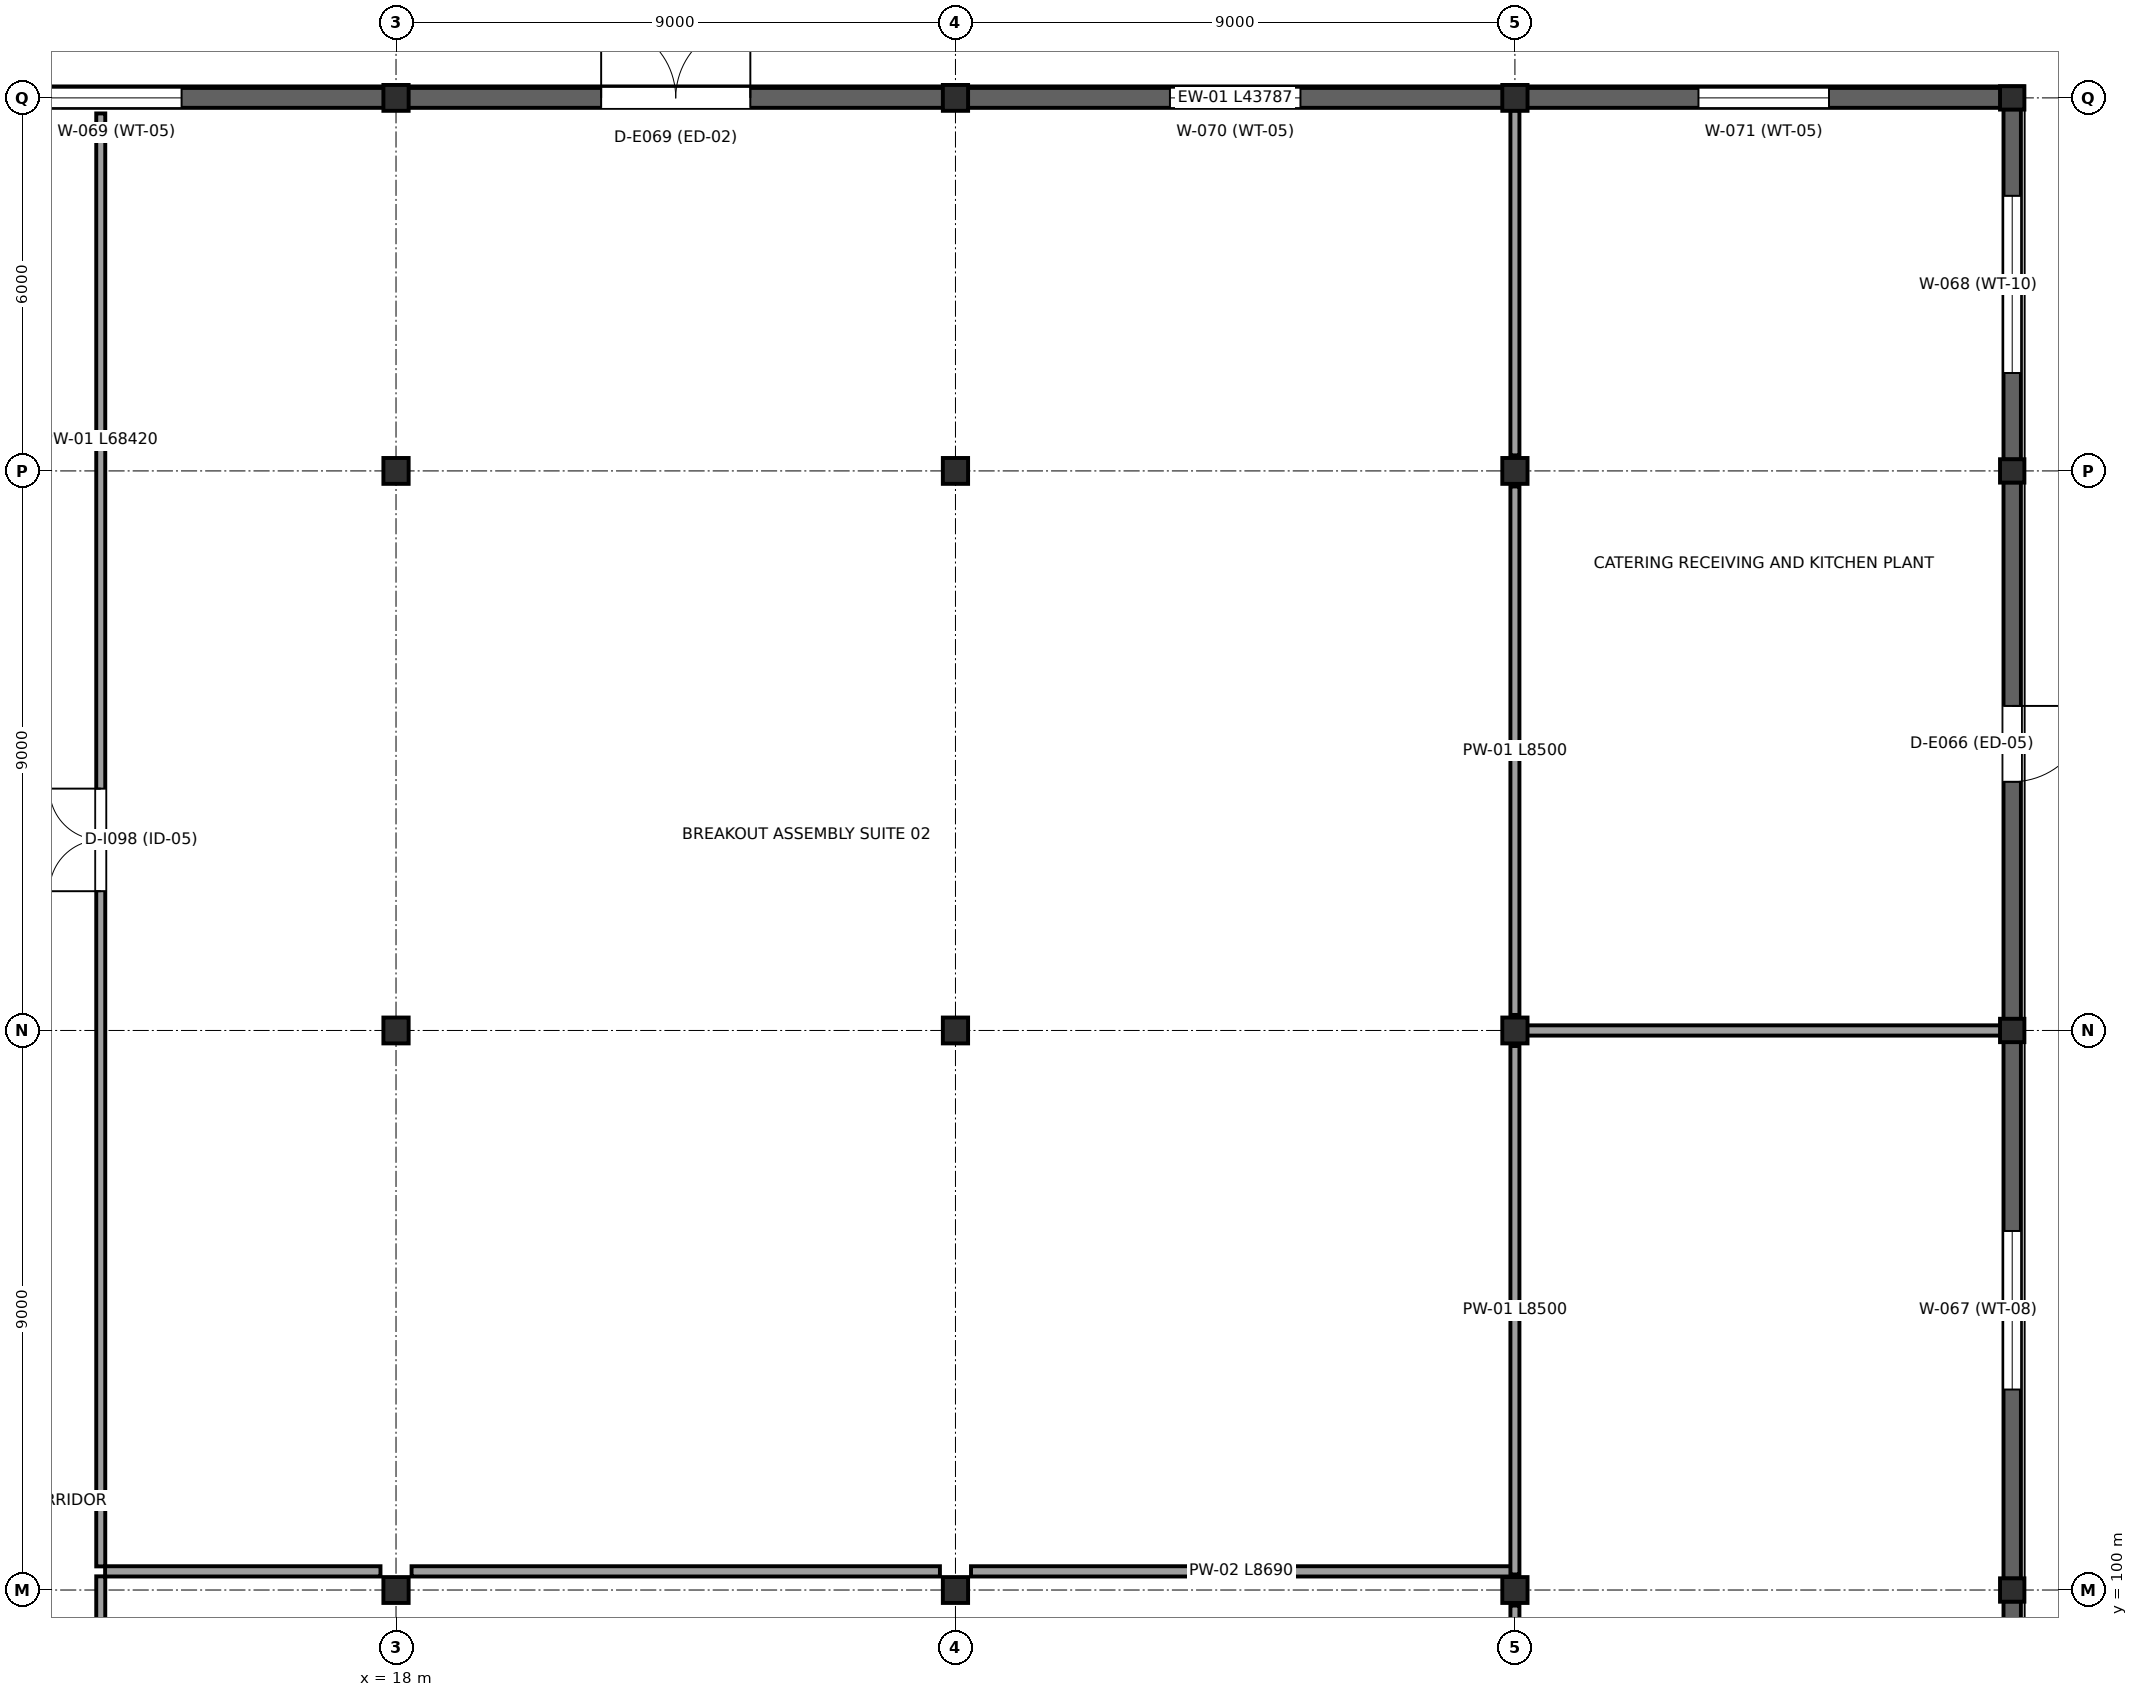
"""IFC4 building model, lengths in metres.
Left out: names, types, materials, properties, quantities, classifications, styles, units other than length and angle.
Written with IfcOpenShell. Run it as: python <this file> out.ifc"""

import sys

from ifc_helpers import new_model, si_unit, direction, frame, frame_2d, origin, origin_2d, place, context, subcontext, project, spatial, rectangle, i_section, extrude, element, fill, save


model = new_model("IFC4")
c1 = context("Model", 3, precision=1e-05, world=origin(), true_north=direction((0.0, 1.0)))
c2 = subcontext(c1, "Body", "Model", "MODEL_VIEW")
j1 = project(units=[si_unit("LENGTHUNIT", "METRE"), si_unit("PLANEANGLEUNIT", "RADIAN")], contexts=[c1])
p1 = place(None, origin())
s1 = spatial("IfcSite", under=j1, at=p1, CompositionType="ELEMENT")
p2 = place(p1, origin())
s2 = spatial("IfcBuilding", under=s1, at=p2, CompositionType="ELEMENT")
p3 = place(p2, origin())
s3 = spatial("IfcBuildingStorey", under=s2, at=p3, CompositionType="ELEMENT", Elevation=0.0)
for number, where, z_axis, x_axis in (
    (1, (18.0, 100.0, 0.0), (0.0, 0.0, 1.0), (1.0, 0.0, 0.0)),
    (2, (18.0, 109.0, 0.0), (0.0, 0.0, 1.0), (1.0, 0.0, 0.0)),
    (3, (18.0, 118.0, 0.0), (0.0, 0.0, 1.0), (1.0, 0.0, 0.0)),
    (4, (18.0, 124.0, 0.0), (0.0, 0.0, 1.0), (1.0, 0.0, 0.0)),
    (5, (27.0, 100.0, 0.0), (0.0, 0.0, 1.0), (1.0, 0.0, 0.0)),
    (6, (27.0, 109.0, 0.0), (0.0, 0.0, 1.0), (1.0, 0.0, 0.0)),
    (7, (27.0, 118.0, 0.0), (0.0, 0.0, 1.0), (1.0, 0.0, 0.0)),
    (8, (27.0, 124.0, 0.0), (0.0, 0.0, 1.0), (1.0, 0.0, 0.0)),
    (9, (36.0, 100.0, 0.0), (0.0, 0.0, 1.0), (1.0, 0.0, 0.0)),
    (10, (36.0, 109.0, 0.0), (0.0, 0.0, 1.0), (1.0, 0.0, 0.0)),
    (11, (36.0, 118.0, 0.0), (0.0, 0.0, 1.0), (1.0, 0.0, 0.0)),
    (12, (36.0, 124.0, 0.0), (0.0, 0.0, 1.0), (1.0, 0.0, 0.0)),
):
    element("IfcColumn", number, at=place(p3, frame(where, z_axis=z_axis, x_axis=x_axis)), inside=s3, PredefinedType="COLUMN", context=c2, shape_type="SweptSolid", body=[
        extrude(i_section(OverallWidth=0.406, OverallDepth=0.416, WebThickness=0.03, FlangeThickness=0.048, at=origin_2d()), origin(), (0.0, 0.0, 1.0), 6.0),
    ])
for number, where, z_axis, x_axis in (
    (13, (44.0, 100.0, 0.0), (0.0, 0.0, 1.0), (1.0, 0.0, 0.0)),
    (14, (44.0, 109.0, 0.0), (0.0, 0.0, 1.0), (1.0, 0.0, 0.0)),
    (15, (44.0, 118.0, 0.0), (0.0, 0.0, 1.0), (1.0, 0.0, 0.0)),
    (16, (44.0, 124.0, 0.0), (0.0, 0.0, 1.0), (1.0, 0.0, 0.0)),
):
    element("IfcColumn", number, at=place(p3, frame(where, z_axis=z_axis, x_axis=x_axis)), inside=s3, PredefinedType="COLUMN", context=c2, shape_type="SweptSolid", body=[
        extrude(i_section(OverallWidth=0.392, OverallDepth=0.376, WebThickness=0.017, FlangeThickness=0.028, at=origin_2d()), origin(), (0.0, 0.0, 1.0), 6.0),
    ])
p4 = place(p3, frame((44.0, 99.818, 0.0), z_axis=(0.0, 0.0, 1.0), x_axis=(0.0, -1.0, 0.0)))
e17 = element("IfcWall", 17, at=p4, inside=s3, PredefinedType="STANDARD", context=c2, shape_type="SweptSolid", body=[
    extrude(rectangle(XDim=8.636, YDim=0.28, at=frame_2d((4.318, 0.0))), origin(), (0.0, 0.0, 1.0), 5.78),
])
p5 = place(p4, frame((4.818, 0.0, 0.0)))
e18 = element("IfcOpeningElement", 18, at=p5, cuts=e17, PredefinedType="OPENING", context=c2, shape_type="SweptSolid", body=[
    extrude(rectangle(XDim=2.0, YDim=2.4, at=frame_2d((1.0, 1.2))), frame((0.0, 0.15, 0.0), z_axis=(0.0, -1.0, 0.0), x_axis=(1.0, 0.0, 0.0)), (0.0, 0.0, 1.0), 0.3),
])
p6 = place(p3, frame((44.0, 108.818, 0.0), z_axis=(0.0, 0.0, 1.0), x_axis=(0.0, -1.0, 0.0)))
e19 = element("IfcWall", 19, at=p6, inside=s3, PredefinedType="STANDARD", context=c2, shape_type="SweptSolid", body=[
    extrude(rectangle(XDim=8.636, YDim=0.28, at=frame_2d((4.318, 0.0))), origin(), (0.0, 0.0, 1.0), 5.78),
])
p7 = place(p6, frame((3.043, 0.0, 1.0)))
e20 = element("IfcOpeningElement", 20, at=p7, cuts=e19, PredefinedType="OPENING", context=c2, shape_type="SweptSolid", body=[
    extrude(rectangle(XDim=2.55, YDim=2.4, at=frame_2d((1.275, 1.2))), frame((0.0, 0.15, 0.0), z_axis=(0.0, -1.0, 0.0), x_axis=(1.0, 0.0, 0.0)), (0.0, 0.0, 1.0), 0.3),
])
p8 = place(p3, frame((44.0, 117.818, 0.0), z_axis=(0.0, 0.0, 1.0), x_axis=(0.0, -1.0, 0.0)))
e21 = element("IfcWall", 21, at=p8, inside=s3, PredefinedType="STANDARD", context=c2, shape_type="SweptSolid", body=[
    extrude(rectangle(XDim=8.636, YDim=0.28, at=frame_2d((4.318, 0.0))), origin(), (0.0, 0.0, 1.0), 5.78),
])
p9 = place(p8, frame((3.598, 0.0, 0.0)))
e22 = element("IfcOpeningElement", 22, at=p9, cuts=e21, PredefinedType="OPENING", context=c2, shape_type="SweptSolid", body=[
    extrude(rectangle(XDim=1.22, YDim=2.32, at=frame_2d((0.61, 1.16))), frame((0.0, 0.15, 0.0), z_axis=(0.0, -1.0, 0.0), x_axis=(1.0, 0.0, 0.0)), (0.0, 0.0, 1.0), 0.3),
])
p10 = place(p3, frame((44.0, 123.818, 0.0), z_axis=(0.0, 0.0, 1.0), x_axis=(0.0, -1.0, 0.0)))
e23 = element("IfcWall", 23, at=p10, inside=s3, PredefinedType="STANDARD", context=c2, shape_type="SweptSolid", body=[
    extrude(rectangle(XDim=5.636, YDim=0.28, at=frame_2d((2.818, 0.0))), origin(), (0.0, 0.0, 1.0), 5.78),
])
p11 = place(p10, frame((1.393, 0.0, 1.0)))
e24 = element("IfcOpeningElement", 24, at=p11, cuts=e23, PredefinedType="OPENING", context=c2, shape_type="SweptSolid", body=[
    extrude(rectangle(XDim=2.85, YDim=2.4, at=frame_2d((1.425, 1.2))), frame((0.0, 0.15, 0.0), z_axis=(0.0, -1.0, 0.0), x_axis=(1.0, 0.0, 0.0)), (0.0, 0.0, 1.0), 0.3),
])
p12 = place(p3, frame((9.022, 124.0, 0.0), z_axis=(0.0, 0.0, 1.0), x_axis=(1.0, 0.0, 0.0)))
e25 = element("IfcWall", 25, at=p12, inside=s3, PredefinedType="STANDARD", context=c2, shape_type="SweptSolid", body=[
    extrude(rectangle(XDim=8.956, YDim=0.32, at=frame_2d((4.478, 0.0))), origin(), (0.0, 0.0, 1.0), 5.78),
])
p13 = place(p12, frame((3.428, 0.0, 1.0)))
e26 = element("IfcOpeningElement", 26, at=p13, cuts=e25, PredefinedType="OPENING", context=c2, shape_type="SweptSolid", body=[
    extrude(rectangle(XDim=2.1, YDim=2.25, at=frame_2d((1.05, 1.125))), frame((0.0, 0.17, 0.0), z_axis=(0.0, -1.0, 0.0), x_axis=(1.0, 0.0, 0.0)), (0.0, 0.0, 1.0), 0.34),
])
p14 = place(p3, frame((18.022, 124.0, 0.0), z_axis=(0.0, 0.0, 1.0), x_axis=(1.0, 0.0, 0.0)))
e27 = element("IfcWall", 27, at=p14, inside=s3, PredefinedType="STANDARD", context=c2, shape_type="SweptSolid", body=[
    extrude(rectangle(XDim=8.956, YDim=0.32, at=frame_2d((4.478, 0.0))), origin(), (0.0, 0.0, 1.0), 5.78),
])
p15 = place(p14, frame((3.278, 0.0, 0.0)))
e28 = element("IfcOpeningElement", 28, at=p15, cuts=e27, PredefinedType="OPENING", context=c2, shape_type="SweptSolid", body=[
    extrude(rectangle(XDim=2.4, YDim=2.6, at=frame_2d((1.2, 1.3))), frame((0.0, 0.17, 0.0), z_axis=(0.0, -1.0, 0.0), x_axis=(1.0, 0.0, 0.0)), (0.0, 0.0, 1.0), 0.34),
])
p16 = place(p3, frame((27.022, 124.0, 0.0), z_axis=(0.0, 0.0, 1.0), x_axis=(1.0, 0.0, 0.0)))
e29 = element("IfcWall", 29, at=p16, inside=s3, PredefinedType="STANDARD", context=c2, shape_type="SweptSolid", body=[
    extrude(rectangle(XDim=8.956, YDim=0.32, at=frame_2d((4.478, 0.0))), origin(), (0.0, 0.0, 1.0), 5.78),
])
p17 = place(p16, frame((3.428, 0.0, 1.0)))
e30 = element("IfcOpeningElement", 30, at=p17, cuts=e29, PredefinedType="OPENING", context=c2, shape_type="SweptSolid", body=[
    extrude(rectangle(XDim=2.1, YDim=2.25, at=frame_2d((1.05, 1.125))), frame((0.0, 0.17, 0.0), z_axis=(0.0, -1.0, 0.0), x_axis=(1.0, 0.0, 0.0)), (0.0, 0.0, 1.0), 0.34),
])
p18 = place(p3, frame((36.022, 124.0, 0.0), z_axis=(0.0, 0.0, 1.0), x_axis=(1.0, 0.0, 0.0)))
e31 = element("IfcWall", 31, at=p18, inside=s3, PredefinedType="STANDARD", context=c2, shape_type="SweptSolid", body=[
    extrude(rectangle(XDim=7.963, YDim=0.32, at=frame_2d((3.981, 0.0))), origin(), (0.0, 0.0, 1.0), 5.78),
])
p19 = place(p18, frame((2.931, 0.0, 1.0)))
e32 = element("IfcOpeningElement", 32, at=p19, cuts=e31, PredefinedType="OPENING", context=c2, shape_type="SweptSolid", body=[
    extrude(rectangle(XDim=2.1, YDim=2.25, at=frame_2d((1.05, 1.125))), frame((0.0, 0.17, 0.0), z_axis=(0.0, -1.0, 0.0), x_axis=(1.0, 0.0, 0.0)), (0.0, 0.0, 1.0), 0.34),
])
p20 = place(p3, frame((13.25, 82.08, 0.0), z_axis=(0.0, 0.0, 1.0), x_axis=(0.0, 1.0, 0.0)))
e33 = element("IfcWall", 33, at=p20, inside=s3, PredefinedType="PARTITIONING", context=c2, shape_type="SweptSolid", body=[
    extrude(rectangle(XDim=18.14, YDim=0.145, at=frame_2d((9.07, 0.0))), origin(), (0.0, 0.0, 1.0), 4.65),
])
p21 = place(p20, frame((8.245, 0.0, 0.0)))
e34 = element("IfcOpeningElement", 34, at=p21, cuts=e33, PredefinedType="OPENING", context=c2, shape_type="SweptSolid", body=[
    extrude(rectangle(XDim=1.65, YDim=2.25, at=frame_2d((0.825, 1.125))), frame((0.0, 0.083, 0.0), z_axis=(0.0, -1.0, 0.0), x_axis=(1.0, 0.0, 0.0)), (0.0, 0.0, 1.0), 0.165),
])
p22 = place(p3, frame((13.25, 100.38, 0.0), z_axis=(0.0, 0.0, 1.0), x_axis=(0.0, 1.0, 0.0)))
e35 = element("IfcWall", 35, at=p22, inside=s3, PredefinedType="PARTITIONING", context=c2, shape_type="SweptSolid", body=[
    extrude(rectangle(XDim=23.37, YDim=0.145, at=frame_2d((11.685, 0.0))), origin(), (0.0, 0.0, 1.0), 4.65),
])
p23 = place(p22, frame((10.86, 0.0, 0.0)))
e36 = element("IfcOpeningElement", 36, at=p23, cuts=e35, PredefinedType="OPENING", context=c2, shape_type="SweptSolid", body=[
    extrude(rectangle(XDim=1.65, YDim=2.25, at=frame_2d((0.825, 1.125))), frame((0.0, 0.083, 0.0), z_axis=(0.0, -1.0, 0.0), x_axis=(1.0, 0.0, 0.0)), (0.0, 0.0, 1.0), 0.165),
])
p24 = place(p3, frame((13.32, 100.3, 0.0), z_axis=(0.0, 0.0, 1.0), x_axis=(1.0, 0.0, 0.0)))
e37 = element("IfcWall", 37, at=p24, inside=s3, PredefinedType="PARTITIONING", context=c2, shape_type="SweptSolid", body=[
    extrude(rectangle(XDim=4.43, YDim=0.165, at=frame_2d((2.215, 0.0))), origin(), (0.0, 0.0, 1.0), 4.65),
])
p25 = place(p3, frame((18.25, 100.3, 0.0), z_axis=(0.0, 0.0, 1.0), x_axis=(1.0, 0.0, 0.0)))
e38 = element("IfcWall", 38, at=p25, inside=s3, PredefinedType="PARTITIONING", context=c2, shape_type="SweptSolid", body=[
    extrude(rectangle(XDim=8.5, YDim=0.165, at=frame_2d((4.25, 0.0))), origin(), (0.0, 0.0, 1.0), 4.65),
])
p26 = place(p3, frame((27.25, 100.3, 0.0), z_axis=(0.0, 0.0, 1.0), x_axis=(1.0, 0.0, 0.0)))
e39 = element("IfcWall", 39, at=p26, inside=s3, PredefinedType="PARTITIONING", context=c2, shape_type="SweptSolid", body=[
    extrude(rectangle(XDim=8.69, YDim=0.165, at=frame_2d((4.345, 0.0))), origin(), (0.0, 0.0, 1.0), 4.65),
])
for number, where, z_axis, x_axis in (
    (40, (36.0, 91.25, 0.0), (0.0, 0.0, 1.0), (0.0, 1.0, 0.0)),
    (41, (36.0, 100.25, 0.0), (0.0, 0.0, 1.0), (0.0, 1.0, 0.0)),
    (42, (36.0, 109.25, 0.0), (0.0, 0.0, 1.0), (0.0, 1.0, 0.0)),
):
    element("IfcWall", number, at=place(p3, frame(where, z_axis=z_axis, x_axis=x_axis)), inside=s3, PredefinedType="PARTITIONING", context=c2, shape_type="SweptSolid", body=[
        extrude(rectangle(XDim=8.5, YDim=0.145, at=frame_2d((4.25, 0.0))), origin(), (0.0, 0.0, 1.0), 4.65),
    ])
p27 = place(p3, frame((36.0, 118.25, 0.0), z_axis=(0.0, 0.0, 1.0), x_axis=(0.0, 1.0, 0.0)))
e43 = element("IfcWall", 43, at=p27, inside=s3, PredefinedType="PARTITIONING", context=c2, shape_type="SweptSolid", body=[
    extrude(rectangle(XDim=5.55, YDim=0.145, at=frame_2d((2.775, 0.0))), origin(), (0.0, 0.0, 1.0), 4.65),
])
p28 = place(p3, frame((36.15, 109.0, 0.0), z_axis=(0.0, 0.0, 1.0), x_axis=(1.0, 0.0, 0.0)))
e44 = element("IfcWall", 44, at=p28, inside=s3, PredefinedType="PARTITIONING", context=c2, shape_type="SweptSolid", body=[
    extrude(rectangle(XDim=7.7, YDim=0.165, at=frame_2d((3.85, 0.0))), origin(), (0.0, 0.0, 1.0), 4.65),
])
p29 = place(p7, origin())
e45 = element("IfcWindow", 45, at=p29, inside=s3, PartitioningType="SINGLE_PANEL", PredefinedType="WINDOW", context=c2, shape_type="SweptSolid", body=[
    extrude(rectangle(XDim=2.55, YDim=2.4, at=frame_2d((1.275, 1.2))), frame((0.0, 0.03, 0.0), z_axis=(0.0, -1.0, 0.0), x_axis=(1.0, 0.0, 0.0)), (0.0, 0.0, 1.0), 0.06),
])
fill(e20, e45)
p30 = place(p9, origin())
e46 = element("IfcDoor", 46, at=p30, inside=s3, OperationType="NOTDEFINED", PredefinedType="DOOR", context=c2, shape_type="SweptSolid", body=[
    extrude(rectangle(XDim=1.22, YDim=2.32, at=frame_2d((0.61, 1.16))), frame((0.0, 0.025, 0.0), z_axis=(0.0, -1.0, 0.0), x_axis=(1.0, 0.0, 0.0)), (0.0, 0.0, 1.0), 0.05),
])
fill(e22, e46)
p31 = place(p11, origin())
e47 = element("IfcWindow", 47, at=p31, inside=s3, PartitioningType="SINGLE_PANEL", PredefinedType="WINDOW", context=c2, shape_type="SweptSolid", body=[
    extrude(rectangle(XDim=2.85, YDim=2.4, at=frame_2d((1.425, 1.2))), frame((0.0, 0.03, 0.0), z_axis=(0.0, -1.0, 0.0), x_axis=(1.0, 0.0, 0.0)), (0.0, 0.0, 1.0), 0.06),
])
fill(e24, e47)
p32 = place(p13, origin())
e48 = element("IfcWindow", 48, at=p32, inside=s3, PartitioningType="SINGLE_PANEL", PredefinedType="WINDOW", context=c2, shape_type="SweptSolid", body=[
    extrude(rectangle(XDim=2.1, YDim=2.25, at=frame_2d((1.05, 1.125))), frame((0.0, 0.03, 0.0), z_axis=(0.0, -1.0, 0.0), x_axis=(1.0, 0.0, 0.0)), (0.0, 0.0, 1.0), 0.06),
])
fill(e26, e48)
p33 = place(p15, origin())
e49 = element("IfcDoor", 49, at=p33, inside=s3, OperationType="DOUBLE_DOOR_SINGLE_SWING", PredefinedType="DOOR", context=c2, shape_type="SweptSolid", body=[
    extrude(rectangle(XDim=2.4, YDim=2.6, at=frame_2d((1.2, 1.3))), frame((0.0, 0.025, 0.0), z_axis=(0.0, -1.0, 0.0), x_axis=(1.0, 0.0, 0.0)), (0.0, 0.0, 1.0), 0.05),
])
fill(e28, e49)
p34 = place(p17, origin())
e50 = element("IfcWindow", 50, at=p34, inside=s3, PartitioningType="SINGLE_PANEL", PredefinedType="WINDOW", context=c2, shape_type="SweptSolid", body=[
    extrude(rectangle(XDim=2.1, YDim=2.25, at=frame_2d((1.05, 1.125))), frame((0.0, 0.03, 0.0), z_axis=(0.0, -1.0, 0.0), x_axis=(1.0, 0.0, 0.0)), (0.0, 0.0, 1.0), 0.06),
])
fill(e30, e50)
p35 = place(p19, origin())
e51 = element("IfcWindow", 51, at=p35, inside=s3, PartitioningType="SINGLE_PANEL", PredefinedType="WINDOW", context=c2, shape_type="SweptSolid", body=[
    extrude(rectangle(XDim=2.1, YDim=2.25, at=frame_2d((1.05, 1.125))), frame((0.0, 0.03, 0.0), z_axis=(0.0, -1.0, 0.0), x_axis=(1.0, 0.0, 0.0)), (0.0, 0.0, 1.0), 0.06),
])
fill(e32, e51)
p36 = place(p23, origin())
e52 = element("IfcDoor", 52, at=p36, inside=s3, OperationType="DOUBLE_DOOR_SINGLE_SWING", PredefinedType="DOOR", context=c2, shape_type="SweptSolid", body=[
    extrude(rectangle(XDim=1.65, YDim=2.25, at=frame_2d((0.825, 1.125))), frame((0.0, 0.025, 0.0), z_axis=(0.0, -1.0, 0.0), x_axis=(1.0, 0.0, 0.0)), (0.0, 0.0, 1.0), 0.05),
])
fill(e36, e52)
save(model, sys.argv[1])
